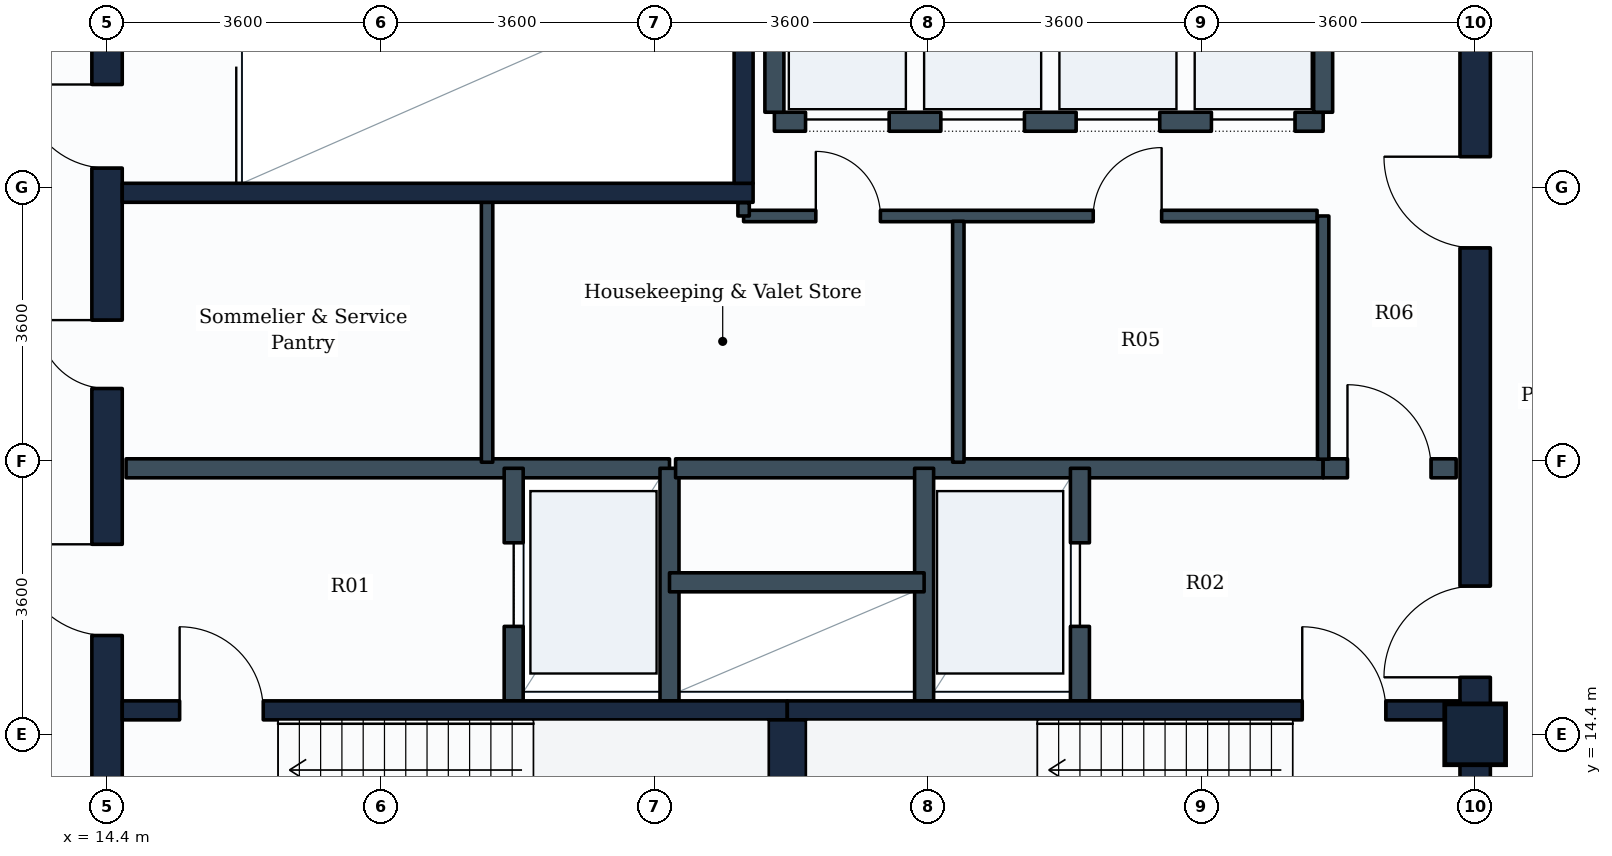
"""IFC4 building model, lengths in metres.
Left out: names, types, materials, properties, quantities, classifications, styles, units other than length and angle.
Written with IfcOpenShell. Run it as: python <this file> out.ifc"""

import sys

from ifc_helpers import new_model, si_unit, direction, frame, frame_2d, origin, origin_2d, place, context, subcontext, project, spatial, rectangle, extrude, element, fill, save


model = new_model("IFC4")
c1 = context("Model", 3, precision=1e-05, world=origin(), true_north=direction((0.0, 1.0)))
c2 = subcontext(c1, "Body", "Model", "MODEL_VIEW")
j1 = project(units=[si_unit("LENGTHUNIT", "METRE"), si_unit("PLANEANGLEUNIT", "RADIAN")], contexts=[c1])
p1 = place(None, origin())
s1 = spatial("IfcSite", under=j1, at=p1, CompositionType="ELEMENT")
p2 = place(p1, origin())
s2 = spatial("IfcBuilding", under=s1, at=p2, CompositionType="ELEMENT")
p3 = place(p2, frame((0.0, 0.0, 299.8)))
s3 = spatial("IfcBuildingStorey", under=s2, at=p3, CompositionType="ELEMENT", Elevation=299.8)
p4 = place(p3, frame((32.4, 14.4, 0.0), z_axis=(0.0, 0.0, 1.0), x_axis=(1.0, 0.0, 0.0)))
e1 = element("IfcColumn", 1, at=p4, inside=s3, PredefinedType="COLUMN", context=c2, shape_type="SweptSolid", body=[
    extrude(rectangle(XDim=0.8, YDim=0.8, at=origin_2d()), origin(), (0.0, 0.0, 1.0), 4.4),
])
p5 = place(p3, frame((14.4, 10.8, 0.0), z_axis=(0.0, 0.0, 1.0), x_axis=(0.0, 1.0, 0.0)))
e2 = element("IfcWall", 2, at=p5, inside=s3, PredefinedType="SHEAR", context=c2, shape_type="SweptSolid", body=[
    extrude(rectangle(XDim=14.4, YDim=0.4, at=frame_2d((7.2, 0.0))), origin(), (0.0, 0.0, 1.0), 4.15),
])
p6 = place(p5, frame((11.05, 0.0, 0.0)))
e3 = element("IfcOpeningElement", 3, at=p6, cuts=e2, PredefinedType="OPENING", context=c2, shape_type="SweptSolid", body=[
    extrude(rectangle(XDim=1.1, YDim=2.1, at=frame_2d((0.55, 1.05))), frame((0.0, 0.21, 0.0), z_axis=(0.0, -1.0, 0.0), x_axis=(1.0, 0.0, 0.0)), (0.0, 0.0, 1.0), 0.42),
])
p7 = place(p5, frame((4.9, 0.0, 0.0)))
e4 = element("IfcOpeningElement", 4, at=p7, cuts=e2, PredefinedType="OPENING", context=c2, shape_type="SweptSolid", body=[
    extrude(rectangle(XDim=1.2, YDim=2.1, at=frame_2d((0.6, 1.05))), frame((0.0, 0.21, 0.0), z_axis=(0.0, -1.0, 0.0), x_axis=(1.0, 0.0, 0.0)), (0.0, 0.0, 1.0), 0.42),
])
p8 = place(p5, frame((8.15, 0.0, 0.0)))
e5 = element("IfcOpeningElement", 5, at=p8, cuts=e2, PredefinedType="OPENING", context=c2, shape_type="SweptSolid", body=[
    extrude(rectangle(XDim=0.9, YDim=2.1, at=frame_2d((0.45, 1.05))), frame((0.0, 0.21, 0.0), z_axis=(0.0, -1.0, 0.0), x_axis=(1.0, 0.0, 0.0)), (0.0, 0.0, 1.0), 0.42),
])
p9 = place(p3, frame((32.4, 10.8, 0.0), z_axis=(0.0, 0.0, 1.0), x_axis=(0.0, 1.0, 0.0)))
e6 = element("IfcWall", 6, at=p9, inside=s3, PredefinedType="SHEAR", context=c2, shape_type="SweptSolid", body=[
    extrude(rectangle(XDim=14.4, YDim=0.4, at=frame_2d((7.2, 0.0))), origin(), (0.0, 0.0, 1.0), 4.15),
])
p10 = place(p9, frame((4.35, 0.0, 0.0)))
e7 = element("IfcOpeningElement", 7, at=p10, cuts=e6, PredefinedType="OPENING", context=c2, shape_type="SweptSolid", body=[
    extrude(rectangle(XDim=1.2, YDim=2.1, at=frame_2d((0.6, 1.05))), frame((0.0, 0.21, 0.0), z_axis=(0.0, -1.0, 0.0), x_axis=(1.0, 0.0, 0.0)), (0.0, 0.0, 1.0), 0.42),
])
p11 = place(p9, frame((10.0, 0.0, 0.0)))
e8 = element("IfcOpeningElement", 8, at=p11, cuts=e6, PredefinedType="OPENING", context=c2, shape_type="SweptSolid", body=[
    extrude(rectangle(XDim=1.2, YDim=2.1, at=frame_2d((0.6, 1.05))), frame((0.0, 0.21, 0.0), z_axis=(0.0, -1.0, 0.0), x_axis=(1.0, 0.0, 0.0)), (0.0, 0.0, 1.0), 0.42),
])
p12 = place(p3, frame((14.6, 14.715, 0.0), z_axis=(0.0, 0.0, 1.0), x_axis=(1.0, 0.0, 0.0)))
e9 = element("IfcWall", 9, at=p12, inside=s3, PredefinedType="SHEAR", context=c2, shape_type="SweptSolid", body=[
    extrude(rectangle(XDim=8.75, YDim=0.25, at=frame_2d((4.375, 0.0))), origin(), (0.0, 0.0, 1.0), 4.15),
])
p13 = place(p12, frame((0.755, 0.0, 0.0)))
e10 = element("IfcOpeningElement", 10, at=p13, cuts=e9, PredefinedType="OPENING", context=c2, shape_type="SweptSolid", body=[
    extrude(rectangle(XDim=1.1, YDim=2.1, at=frame_2d((0.55, 1.05))), frame((0.0, 0.135, 0.0), z_axis=(0.0, -1.0, 0.0), x_axis=(1.0, 0.0, 0.0)), (0.0, 0.0, 1.0), 0.27),
])
p14 = place(p3, frame((23.35, 14.715, 0.0), z_axis=(0.0, 0.0, 1.0), x_axis=(1.0, 0.0, 0.0)))
e11 = element("IfcWall", 11, at=p14, inside=s3, PredefinedType="SHEAR", context=c2, shape_type="SweptSolid", body=[
    extrude(rectangle(XDim=8.85, YDim=0.25, at=frame_2d((4.425, 0.0))), origin(), (0.0, 0.0, 1.0), 4.15),
])
p15 = place(p14, frame((6.775, 0.0, 0.0)))
e12 = element("IfcOpeningElement", 12, at=p15, cuts=e11, PredefinedType="OPENING", context=c2, shape_type="SweptSolid", body=[
    extrude(rectangle(XDim=1.1, YDim=2.1, at=frame_2d((0.55, 1.05))), frame((0.0, 0.135, 0.0), z_axis=(0.0, -1.0, 0.0), x_axis=(1.0, 0.0, 0.0)), (0.0, 0.0, 1.0), 0.27),
])
p16 = place(p3, frame((23.35, 11.75, 0.0), z_axis=(0.0, 0.0, 1.0), x_axis=(0.0, 1.0, 0.0)))
e13 = element("IfcWall", 13, at=p16, inside=s3, PredefinedType="SHEAR", context=c2, shape_type="SweptSolid", body=[
    extrude(rectangle(XDim=2.84, YDim=0.5, at=frame_2d((1.42, 0.0))), origin(), (0.0, 0.0, 1.0), 4.15),
])
p17 = place(p3, frame((14.6, 21.525, 0.0), z_axis=(0.0, 0.0, 1.0), x_axis=(1.0, 0.0, 0.0)))
e14 = element("IfcWall", 14, at=p17, inside=s3, PredefinedType="SHEAR", context=c2, shape_type="SweptSolid", body=[
    extrude(rectangle(XDim=8.3, YDim=0.25, at=frame_2d((4.15, 0.0))), origin(), (0.0, 0.0, 1.0), 4.15),
])
p18 = place(p3, frame((22.775, 21.65, 0.0), z_axis=(0.0, 0.0, 1.0), x_axis=(0.0, 1.0, 0.0)))
e15 = element("IfcWall", 15, at=p18, inside=s3, PredefinedType="SHEAR", context=c2, shape_type="SweptSolid", body=[
    extrude(rectangle(XDim=2.84, YDim=0.25, at=frame_2d((1.42, 0.0))), origin(), (0.0, 0.0, 1.0), 4.15),
])
p19 = place(p3, frame((14.65, 17.9, 0.0), z_axis=(0.0, 0.0, 1.0), x_axis=(1.0, 0.0, 0.0)))
e16 = element("IfcWall", 16, at=p19, inside=s3, PredefinedType="PARTITIONING", context=c2, shape_type="SweptSolid", body=[
    extrude(rectangle(XDim=7.15, YDim=0.25, at=frame_2d((3.575, 0.0))), origin(), (0.0, 0.0, 1.0), 4.135),
])
p20 = place(p3, frame((19.75, 14.84, 0.0), z_axis=(0.0, 0.0, 1.0), x_axis=(0.0, 1.0, 0.0)))
e17 = element("IfcWall", 17, at=p20, inside=s3, PredefinedType="PARTITIONING", context=c2, shape_type="SweptSolid", body=[
    extrude(rectangle(XDim=3.06, YDim=0.25, at=frame_2d((1.53, 0.0))), origin(), (0.0, 0.0, 1.0), 4.135),
])
p21 = place(p20, frame((0.98, 0.0, 0.0)))
e18 = element("IfcOpeningElement", 18, at=p21, cuts=e17, PredefinedType="OPENING", context=c2, shape_type="SweptSolid", body=[
    extrude(rectangle(XDim=1.1, YDim=2.1, at=frame_2d((0.55, 1.05))), frame((0.0, 0.135, 0.0), z_axis=(0.0, -1.0, 0.0), x_axis=(1.0, 0.0, 0.0)), (0.0, 0.0, 1.0), 0.27),
])
p22 = place(p3, frame((21.8, 14.84, 0.0), z_axis=(0.0, 0.0, 1.0), x_axis=(0.0, 1.0, 0.0)))
e19 = element("IfcWall", 19, at=p22, inside=s3, PredefinedType="PARTITIONING", context=c2, shape_type="SweptSolid", body=[
    extrude(rectangle(XDim=3.06, YDim=0.25, at=frame_2d((1.53, 0.0))), origin(), (0.0, 0.0, 1.0), 4.135),
])
p23 = place(p3, frame((21.88, 17.9, 0.0), z_axis=(0.0, 0.0, 1.0), x_axis=(1.0, 0.0, 0.0)))
e20 = element("IfcWall", 20, at=p23, inside=s3, PredefinedType="PARTITIONING", context=c2, shape_type="SweptSolid", body=[
    extrude(rectangle(XDim=8.52, YDim=0.25, at=frame_2d((4.26, 0.0))), origin(), (0.0, 0.0, 1.0), 4.135),
])
p24 = place(p3, frame((30.4, 17.9, 0.0), z_axis=(0.0, 0.0, 1.0), x_axis=(1.0, 0.0, 0.0)))
e21 = element("IfcWall", 21, at=p24, inside=s3, PredefinedType="PARTITIONING", context=c2, shape_type="SweptSolid", body=[
    extrude(rectangle(XDim=1.75, YDim=0.25, at=frame_2d((0.875, 0.0))), origin(), (0.0, 0.0, 1.0), 4.135),
])
p25 = place(p24, frame((0.32, 0.0, 0.0)))
e22 = element("IfcOpeningElement", 22, at=p25, cuts=e21, PredefinedType="OPENING", context=c2, shape_type="SweptSolid", body=[
    extrude(rectangle(XDim=1.1, YDim=2.1, at=frame_2d((0.55, 1.05))), frame((0.0, 0.135, 0.0), z_axis=(0.0, -1.0, 0.0), x_axis=(1.0, 0.0, 0.0)), (0.0, 0.0, 1.0), 0.27),
])
p26 = place(p3, frame((25.15, 14.84, 0.0), z_axis=(0.0, 0.0, 1.0), x_axis=(0.0, 1.0, 0.0)))
e23 = element("IfcWall", 23, at=p26, inside=s3, PredefinedType="PARTITIONING", context=c2, shape_type="SweptSolid", body=[
    extrude(rectangle(XDim=3.06, YDim=0.25, at=frame_2d((1.53, 0.0))), origin(), (0.0, 0.0, 1.0), 4.135),
])
p27 = place(p3, frame((27.2, 14.84, 0.0), z_axis=(0.0, 0.0, 1.0), x_axis=(0.0, 1.0, 0.0)))
e24 = element("IfcWall", 24, at=p27, inside=s3, PredefinedType="PARTITIONING", context=c2, shape_type="SweptSolid", body=[
    extrude(rectangle(XDim=3.06, YDim=0.25, at=frame_2d((1.53, 0.0))), origin(), (0.0, 0.0, 1.0), 4.135),
])
p28 = place(p27, frame((0.98, 0.0, 0.0)))
e25 = element("IfcOpeningElement", 25, at=p28, cuts=e24, PredefinedType="OPENING", context=c2, shape_type="SweptSolid", body=[
    extrude(rectangle(XDim=1.1, YDim=2.1, at=frame_2d((0.55, 1.05))), frame((0.0, 0.135, 0.0), z_axis=(0.0, -1.0, 0.0), x_axis=(1.0, 0.0, 0.0)), (0.0, 0.0, 1.0), 0.27),
])
p29 = place(p3, frame((21.8, 16.4, 0.0), z_axis=(0.0, 0.0, 1.0), x_axis=(1.0, 0.0, 0.0)))
e26 = element("IfcWall", 26, at=p29, inside=s3, PredefinedType="PARTITIONING", context=c2, shape_type="SweptSolid", body=[
    extrude(rectangle(XDim=3.35, YDim=0.25, at=frame_2d((1.675, 0.0))), origin(), (0.0, 0.0, 1.0), 4.135),
])
p30 = place(p3, frame((23.18, 22.46, 0.0), z_axis=(0.0, 0.0, 1.0), x_axis=(1.0, 0.0, 0.0)))
e27 = element("IfcWall", 27, at=p30, inside=s3, PredefinedType="PARTITIONING", context=c2, shape_type="SweptSolid", body=[
    extrude(rectangle(XDim=7.22, YDim=0.25, at=frame_2d((3.61, 0.0))), origin(), (0.0, 0.0, 1.0), 4.135),
])
p31 = place(p30, frame((0.41, 0.0, 0.0)))
e28 = element("IfcOpeningElement", 28, at=p31, cuts=e27, PredefinedType="OPENING", context=c2, shape_type="SweptSolid", body=[
    extrude(rectangle(XDim=1.1, YDim=2.1, at=frame_2d((0.55, 1.05))), frame((0.0, 0.135, 0.0), z_axis=(0.0, -1.0, 0.0), x_axis=(1.0, 0.0, 0.0)), (0.0, 0.0, 1.0), 0.27),
])
p32 = place(p30, frame((2.19, 0.0, 0.0)))
e29 = element("IfcOpeningElement", 29, at=p32, cuts=e27, PredefinedType="OPENING", context=c2, shape_type="SweptSolid", body=[
    extrude(rectangle(XDim=1.1, YDim=2.1, at=frame_2d((0.55, 1.05))), frame((0.0, 0.135, 0.0), z_axis=(0.0, -1.0, 0.0), x_axis=(1.0, 0.0, 0.0)), (0.0, 0.0, 1.0), 0.27),
])
p33 = place(p30, frame((3.97, 0.0, 0.0)))
e30 = element("IfcOpeningElement", 30, at=p33, cuts=e27, PredefinedType="OPENING", context=c2, shape_type="SweptSolid", body=[
    extrude(rectangle(XDim=1.1, YDim=2.1, at=frame_2d((0.55, 1.05))), frame((0.0, 0.135, 0.0), z_axis=(0.0, -1.0, 0.0), x_axis=(1.0, 0.0, 0.0)), (0.0, 0.0, 1.0), 0.27),
])
p34 = place(p30, frame((5.75, 0.0, 0.0)))
e31 = element("IfcOpeningElement", 31, at=p34, cuts=e27, PredefinedType="OPENING", context=c2, shape_type="SweptSolid", body=[
    extrude(rectangle(XDim=1.1, YDim=2.1, at=frame_2d((0.55, 1.05))), frame((0.0, 0.135, 0.0), z_axis=(0.0, -1.0, 0.0), x_axis=(1.0, 0.0, 0.0)), (0.0, 0.0, 1.0), 0.27),
])
for number, where, z_axis, x_axis in (
    (32, (23.18, 22.585, 0.0), (0.0, 0.0, 1.0), (0.0, 1.0, 0.0)),
    (33, (30.4, 22.585, 0.0), (0.0, 0.0, 1.0), (0.0, 1.0, 0.0)),
):
    element("IfcWall", number, at=place(p3, frame(where, z_axis=z_axis, x_axis=x_axis)), inside=s3, PredefinedType="PARTITIONING", context=c2, shape_type="SweptSolid", body=[
        extrude(rectangle(XDim=2.315, YDim=0.25, at=frame_2d((1.157, 0.0))), origin(), (0.0, 0.0, 1.0), 4.135),
    ])
p35 = place(p3, frame((22.775, 21.22, 0.0), z_axis=(0.0, 0.0, 1.0), x_axis=(1.0, 0.0, 0.0)))
e34 = element("IfcWall", 34, at=p35, inside=s3, PredefinedType="PARTITIONING", context=c2, shape_type="SweptSolid", body=[
    extrude(rectangle(XDim=7.545, YDim=0.15, at=frame_2d((3.772, 0.0))), origin(), (0.0, 0.0, 1.0), 4.135),
])
p36 = place(p35, frame((0.95, 0.0, 0.0)))
e35 = element("IfcOpeningElement", 35, at=p36, cuts=e34, PredefinedType="OPENING", context=c2, shape_type="SweptSolid", body=[
    extrude(rectangle(XDim=0.85, YDim=2.1, at=frame_2d((0.425, 1.05))), frame((0.0, 0.085, 0.0), z_axis=(0.0, -1.0, 0.0), x_axis=(1.0, 0.0, 0.0)), (0.0, 0.0, 1.0), 0.17),
])
p37 = place(p35, frame((4.6, 0.0, 0.0)))
e36 = element("IfcOpeningElement", 36, at=p37, cuts=e34, PredefinedType="OPENING", context=c2, shape_type="SweptSolid", body=[
    extrude(rectangle(XDim=0.9, YDim=2.1, at=frame_2d((0.45, 1.05))), frame((0.0, 0.085, 0.0), z_axis=(0.0, -1.0, 0.0), x_axis=(1.0, 0.0, 0.0)), (0.0, 0.0, 1.0), 0.17),
])
p38 = place(p3, frame((22.775, 21.22, 0.0), z_axis=(0.0, 0.0, 1.0), x_axis=(0.0, 1.0, 0.0)))
e37 = element("IfcWall", 37, at=p38, inside=s3, PredefinedType="PARTITIONING", context=c2, shape_type="SweptSolid", body=[
    extrude(rectangle(XDim=0.175, YDim=0.15, at=frame_2d((0.087, 0.0))), origin(), (0.0, 0.0, 1.0), 4.135),
])
p39 = place(p3, frame((30.4, 18.02, 0.0), z_axis=(0.0, 0.0, 1.0), x_axis=(0.0, 1.0, 0.0)))
e38 = element("IfcWall", 38, at=p39, inside=s3, PredefinedType="PARTITIONING", context=c2, shape_type="SweptSolid", body=[
    extrude(rectangle(XDim=3.2, YDim=0.15, at=frame_2d((1.6, 0.0))), origin(), (0.0, 0.0, 1.0), 4.135),
])
p40 = place(p3, frame((19.4, 17.98, 0.0), z_axis=(0.0, 0.0, 1.0), x_axis=(0.0, 1.0, 0.0)))
e39 = element("IfcWall", 39, at=p40, inside=s3, PredefinedType="PARTITIONING", context=c2, shape_type="SweptSolid", body=[
    extrude(rectangle(XDim=3.42, YDim=0.15, at=frame_2d((1.71, 0.0))), origin(), (0.0, 0.0, 1.0), 4.135),
])
p41 = place(p3, frame((25.6, 17.98, 0.0), z_axis=(0.0, 0.0, 1.0), x_axis=(0.0, 1.0, 0.0)))
e40 = element("IfcWall", 40, at=p41, inside=s3, PredefinedType="PARTITIONING", context=c2, shape_type="SweptSolid", body=[
    extrude(rectangle(XDim=3.17, YDim=0.15, at=frame_2d((1.585, 0.0))), origin(), (0.0, 0.0, 1.0), 4.135),
])
p42 = place(p13, origin())
e41 = element("IfcDoor", 41, at=p42, inside=s3, OperationType="SINGLE_SWING_LEFT", PredefinedType="DOOR", context=c2, shape_type="SweptSolid", body=[
    extrude(rectangle(XDim=1.1, YDim=2.1, at=frame_2d((0.55, 1.05))), frame((0.0, 0.025, 0.0), z_axis=(0.0, -1.0, 0.0), x_axis=(1.0, 0.0, 0.0)), (0.0, 0.0, 1.0), 0.05),
])
fill(e10, e41)
p43 = place(p15, origin())
e42 = element("IfcDoor", 42, at=p43, inside=s3, OperationType="SINGLE_SWING_LEFT", PredefinedType="DOOR", context=c2, shape_type="SweptSolid", body=[
    extrude(rectangle(XDim=1.1, YDim=2.1, at=frame_2d((0.55, 1.05))), frame((0.0, 0.025, 0.0), z_axis=(0.0, -1.0, 0.0), x_axis=(1.0, 0.0, 0.0)), (0.0, 0.0, 1.0), 0.05),
])
fill(e12, e42)
p44 = place(p6, origin())
e43 = element("IfcDoor", 43, at=p44, inside=s3, OperationType="SINGLE_SWING_RIGHT", PredefinedType="DOOR", context=c2, shape_type="SweptSolid", body=[
    extrude(rectangle(XDim=1.1, YDim=2.1, at=frame_2d((0.55, 1.05))), frame((0.0, 0.025, 0.0), z_axis=(0.0, -1.0, 0.0), x_axis=(1.0, 0.0, 0.0)), (0.0, 0.0, 1.0), 0.05),
])
fill(e3, e43)
p45 = place(p21, origin())
e44 = element("IfcDoor", 44, at=p45, inside=s3, OperationType="SLIDING_TO_LEFT", PredefinedType="DOOR", context=c2, shape_type="SweptSolid", body=[
    extrude(rectangle(XDim=1.1, YDim=2.1, at=frame_2d((0.55, 1.05))), frame((0.0, 0.025, 0.0), z_axis=(0.0, -1.0, 0.0), x_axis=(1.0, 0.0, 0.0)), (0.0, 0.0, 1.0), 0.05),
])
fill(e18, e44)
p46 = place(p28, origin())
e45 = element("IfcDoor", 45, at=p46, inside=s3, OperationType="SLIDING_TO_LEFT", PredefinedType="DOOR", context=c2, shape_type="SweptSolid", body=[
    extrude(rectangle(XDim=1.1, YDim=2.1, at=frame_2d((0.55, 1.05))), frame((0.0, 0.025, 0.0), z_axis=(0.0, -1.0, 0.0), x_axis=(1.0, 0.0, 0.0)), (0.0, 0.0, 1.0), 0.05),
])
fill(e25, e45)
p47 = place(p7, origin())
e46 = element("IfcDoor", 46, at=p47, inside=s3, OperationType="SINGLE_SWING_RIGHT", PredefinedType="DOOR", context=c2, shape_type="SweptSolid", body=[
    extrude(rectangle(XDim=1.2, YDim=2.1, at=frame_2d((0.6, 1.05))), frame((0.0, 0.025, 0.0), z_axis=(0.0, -1.0, 0.0), x_axis=(1.0, 0.0, 0.0)), (0.0, 0.0, 1.0), 0.05),
])
fill(e4, e46)
p48 = place(p10, origin())
e47 = element("IfcDoor", 47, at=p48, inside=s3, OperationType="SINGLE_SWING_LEFT", PredefinedType="DOOR", context=c2, shape_type="SweptSolid", body=[
    extrude(rectangle(XDim=1.2, YDim=2.1, at=frame_2d((0.6, 1.05))), frame((0.0, 0.025, 0.0), z_axis=(0.0, -1.0, 0.0), x_axis=(1.0, 0.0, 0.0)), (0.0, 0.0, 1.0), 0.05),
])
fill(e7, e47)
p49 = place(p25, origin())
e48 = element("IfcDoor", 48, at=p49, inside=s3, OperationType="SINGLE_SWING_LEFT", PredefinedType="DOOR", context=c2, shape_type="SweptSolid", body=[
    extrude(rectangle(XDim=1.1, YDim=2.1, at=frame_2d((0.55, 1.05))), frame((0.0, 0.025, 0.0), z_axis=(0.0, -1.0, 0.0), x_axis=(1.0, 0.0, 0.0)), (0.0, 0.0, 1.0), 0.05),
])
fill(e22, e48)
p50 = place(p31, origin())
e49 = element("IfcDoor", 49, at=p50, inside=s3, OperationType="SLIDING_TO_LEFT", PredefinedType="DOOR", context=c2, shape_type="SweptSolid", body=[
    extrude(rectangle(XDim=1.1, YDim=2.1, at=frame_2d((0.55, 1.05))), frame((0.0, 0.025, 0.0), z_axis=(0.0, -1.0, 0.0), x_axis=(1.0, 0.0, 0.0)), (0.0, 0.0, 1.0), 0.05),
])
fill(e28, e49)
p51 = place(p32, origin())
e50 = element("IfcDoor", 50, at=p51, inside=s3, OperationType="SLIDING_TO_LEFT", PredefinedType="DOOR", context=c2, shape_type="SweptSolid", body=[
    extrude(rectangle(XDim=1.1, YDim=2.1, at=frame_2d((0.55, 1.05))), frame((0.0, 0.025, 0.0), z_axis=(0.0, -1.0, 0.0), x_axis=(1.0, 0.0, 0.0)), (0.0, 0.0, 1.0), 0.05),
])
fill(e29, e50)
p52 = place(p33, origin())
e51 = element("IfcDoor", 51, at=p52, inside=s3, OperationType="SLIDING_TO_LEFT", PredefinedType="DOOR", context=c2, shape_type="SweptSolid", body=[
    extrude(rectangle(XDim=1.1, YDim=2.1, at=frame_2d((0.55, 1.05))), frame((0.0, 0.025, 0.0), z_axis=(0.0, -1.0, 0.0), x_axis=(1.0, 0.0, 0.0)), (0.0, 0.0, 1.0), 0.05),
])
fill(e30, e51)
p53 = place(p34, origin())
e52 = element("IfcDoor", 52, at=p53, inside=s3, OperationType="SLIDING_TO_LEFT", PredefinedType="DOOR", context=c2, shape_type="SweptSolid", body=[
    extrude(rectangle(XDim=1.1, YDim=2.1, at=frame_2d((0.55, 1.05))), frame((0.0, 0.025, 0.0), z_axis=(0.0, -1.0, 0.0), x_axis=(1.0, 0.0, 0.0)), (0.0, 0.0, 1.0), 0.05),
])
fill(e31, e52)
p54 = place(p11, origin())
e53 = element("IfcDoor", 53, at=p54, inside=s3, OperationType="SINGLE_SWING_RIGHT", PredefinedType="DOOR", context=c2, shape_type="SweptSolid", body=[
    extrude(rectangle(XDim=1.2, YDim=2.1, at=frame_2d((0.6, 1.05))), frame((0.0, 0.025, 0.0), z_axis=(0.0, -1.0, 0.0), x_axis=(1.0, 0.0, 0.0)), (0.0, 0.0, 1.0), 0.05),
])
fill(e8, e53)
p55 = place(p8, origin())
e54 = element("IfcDoor", 54, at=p55, inside=s3, OperationType="SINGLE_SWING_RIGHT", PredefinedType="DOOR", context=c2, shape_type="SweptSolid", body=[
    extrude(rectangle(XDim=0.9, YDim=2.1, at=frame_2d((0.45, 1.05))), frame((0.0, 0.025, 0.0), z_axis=(0.0, -1.0, 0.0), x_axis=(1.0, 0.0, 0.0)), (0.0, 0.0, 1.0), 0.05),
])
fill(e5, e54)
p56 = place(p36, origin())
e55 = element("IfcDoor", 55, at=p56, inside=s3, OperationType="SINGLE_SWING_LEFT", PredefinedType="DOOR", context=c2, shape_type="SweptSolid", body=[
    extrude(rectangle(XDim=0.85, YDim=2.1, at=frame_2d((0.425, 1.05))), frame((0.0, 0.025, 0.0), z_axis=(0.0, -1.0, 0.0), x_axis=(1.0, 0.0, 0.0)), (0.0, 0.0, 1.0), 0.05),
])
fill(e35, e55)
p57 = place(p37, origin())
e56 = element("IfcDoor", 56, at=p57, inside=s3, OperationType="SINGLE_SWING_RIGHT", PredefinedType="DOOR", context=c2, shape_type="SweptSolid", body=[
    extrude(rectangle(XDim=0.9, YDim=2.1, at=frame_2d((0.45, 1.05))), frame((0.0, 0.025, 0.0), z_axis=(0.0, -1.0, 0.0), x_axis=(1.0, 0.0, 0.0)), (0.0, 0.0, 1.0), 0.05),
])
fill(e36, e56)
save(model, sys.argv[1])
